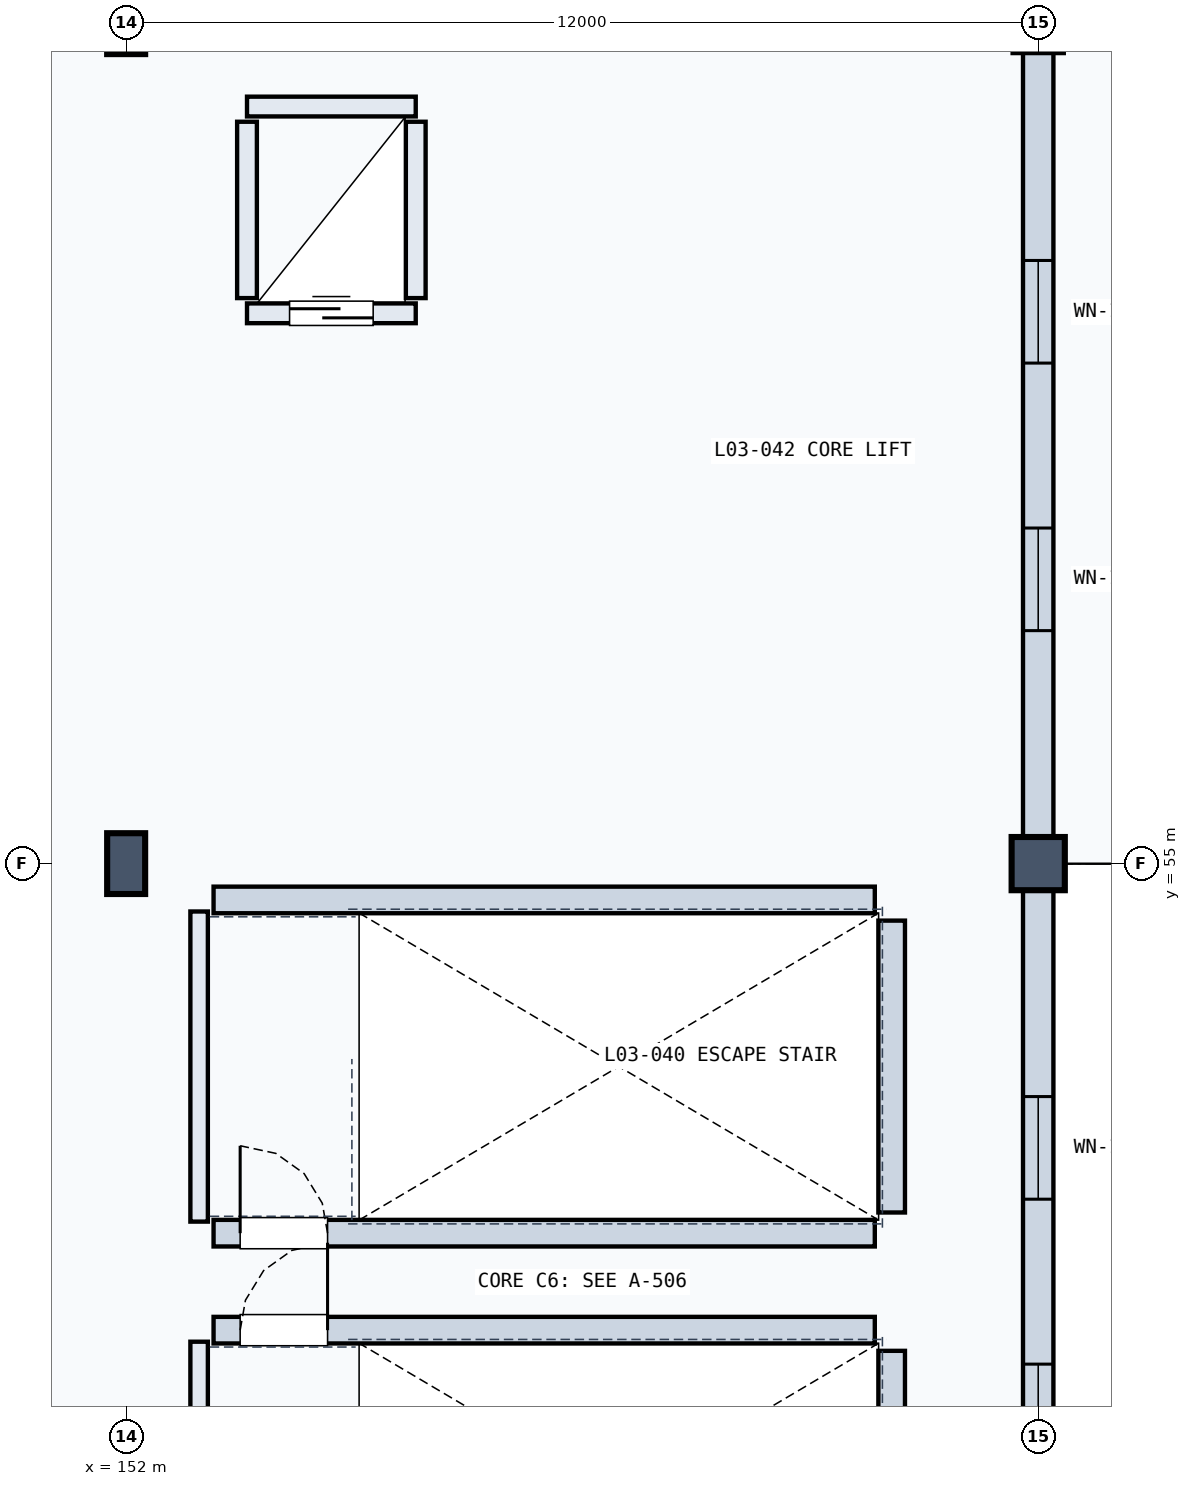
"""IFC4 building model, lengths in metres.
Left out: names, types, materials, properties, quantities, classifications, styles, units other than length and angle.
Written with IfcOpenShell. Run it as: python <this file> out.ifc"""

import sys

from ifc_helpers import new_model, si_unit, direction, frame, frame_2d, origin, origin_2d, place, context, subcontext, project, spatial, rectangle, extrude, element, fill, save


model = new_model("IFC4")
c1 = context("Model", 3, precision=1e-05, world=origin(), true_north=direction((0.0, 1.0)))
c2 = subcontext(c1, "Body", "Model", "MODEL_VIEW")
j1 = project(units=[si_unit("LENGTHUNIT", "METRE"), si_unit("PLANEANGLEUNIT", "RADIAN")], contexts=[c1])
p1 = place(None, origin())
s1 = spatial("IfcSite", under=j1, at=p1, CompositionType="ELEMENT")
p2 = place(p1, origin())
s2 = spatial("IfcBuilding", under=s1, at=p2, CompositionType="ELEMENT")
p3 = place(p2, frame((0.0, 0.0, 14.7)))
s3 = spatial("IfcBuildingStorey", under=s2, at=p3, CompositionType="ELEMENT", Elevation=14.7)
p4 = place(p3, frame((152.0, 55.0, 0.0), z_axis=(0.0, 0.0, 1.0), x_axis=(1.0, 0.0, 0.0)))
e1 = element("IfcColumn", 1, at=p4, inside=s3, PredefinedType="COLUMN", context=c2, shape_type="SweptSolid", body=[
    extrude(rectangle(XDim=0.5, YDim=0.8, at=origin_2d()), origin(), (0.0, 0.0, 1.0), 4.8),
])
p5 = place(p3, frame((152.0, 66.0, 0.0), z_axis=(0.0, 0.0, 1.0), x_axis=(1.0, 0.0, 0.0)))
e2 = element("IfcColumn", 2, at=p5, inside=s3, PredefinedType="COLUMN", context=c2, shape_type="SweptSolid", body=[
    extrude(rectangle(XDim=0.5, YDim=0.7, at=origin_2d()), origin(), (0.0, 0.0, 1.0), 4.8),
])
p6 = place(p3, frame((164.0, 55.0, 0.0), z_axis=(0.0, 0.0, 1.0), x_axis=(1.0, 0.0, 0.0)))
e3 = element("IfcColumn", 3, at=p6, inside=s3, PredefinedType="COLUMN", context=c2, shape_type="SweptSolid", body=[
    extrude(rectangle(XDim=0.7, YDim=0.7, at=origin_2d()), origin(), (0.0, 0.0, 1.0), 4.8),
])
p7 = place(p3, frame((164.0, 66.0, 0.0), z_axis=(0.0, 0.0, 1.0), x_axis=(1.0, 0.0, 0.0)))
e4 = element("IfcColumn", 4, at=p7, inside=s3, PredefinedType="COLUMN", context=c2, shape_type="SweptSolid", body=[
    extrude(rectangle(XDim=0.65, YDim=0.65, at=origin_2d()), origin(), (0.0, 0.0, 1.0), 4.8),
])
p8 = place(p3, frame((164.0, 44.22, 0.0), z_axis=(0.0, 0.0, 1.0), x_axis=(0.0, 1.0, 0.0)))
e5 = element("IfcWall", 5, at=p8, inside=s3, PredefinedType="SOLIDWALL", context=c2, shape_type="SweptSolid", body=[
    extrude(rectangle(XDim=10.56, YDim=0.4, at=frame_2d((5.28, 0.0))), origin(), (0.0, 0.0, 1.0), 3.89),
])
p9 = place(p8, frame((2.845, 0.0, 0.8)))
e6 = element("IfcOpeningElement", 6, at=p9, cuts=e5, PredefinedType="OPENING", context=c2, shape_type="SweptSolid", body=[
    extrude(rectangle(XDim=1.35, YDim=2.1, at=frame_2d((0.675, 1.05))), frame((0.0, 0.21, 0.0), z_axis=(0.0, -1.0, 0.0), x_axis=(1.0, 0.0, 0.0)), (0.0, 0.0, 1.0), 0.42),
])
p10 = place(p8, frame((6.365, 0.0, 0.8)))
e7 = element("IfcOpeningElement", 7, at=p10, cuts=e5, PredefinedType="OPENING", context=c2, shape_type="SweptSolid", body=[
    extrude(rectangle(XDim=1.35, YDim=2.1, at=frame_2d((0.675, 1.05))), frame((0.0, 0.21, 0.0), z_axis=(0.0, -1.0, 0.0), x_axis=(1.0, 0.0, 0.0)), (0.0, 0.0, 1.0), 0.42),
])
p11 = place(p3, frame((164.0, 55.22, 0.0), z_axis=(0.0, 0.0, 1.0), x_axis=(0.0, 1.0, 0.0)))
e8 = element("IfcWall", 8, at=p11, inside=s3, PredefinedType="SOLIDWALL", context=c2, shape_type="SweptSolid", body=[
    extrude(rectangle(XDim=10.56, YDim=0.4, at=frame_2d((5.28, 0.0))), origin(), (0.0, 0.0, 1.0), 4.465),
])
p12 = place(p11, frame((2.845, 0.0, 0.8)))
e9 = element("IfcOpeningElement", 9, at=p12, cuts=e8, PredefinedType="OPENING", context=c2, shape_type="SweptSolid", body=[
    extrude(rectangle(XDim=1.35, YDim=2.1, at=frame_2d((0.675, 1.05))), frame((0.0, 0.21, 0.0), z_axis=(0.0, -1.0, 0.0), x_axis=(1.0, 0.0, 0.0)), (0.0, 0.0, 1.0), 0.42),
])
p13 = place(p11, frame((6.365, 0.0, 0.8)))
e10 = element("IfcOpeningElement", 10, at=p13, cuts=e8, PredefinedType="OPENING", context=c2, shape_type="SweptSolid", body=[
    extrude(rectangle(XDim=1.35, YDim=2.1, at=frame_2d((0.675, 1.05))), frame((0.0, 0.21, 0.0), z_axis=(0.0, -1.0, 0.0), x_axis=(1.0, 0.0, 0.0)), (0.0, 0.0, 1.0), 0.42),
])
p14 = place(p3, frame((152.96, 44.63, 0.0), z_axis=(0.0, 0.0, 1.0), x_axis=(0.0, 1.0, 0.0)))
e11 = element("IfcWall", 11, at=p14, inside=s3, PredefinedType="SOLIDWALL", context=c2, shape_type="SweptSolid", body=[
    extrude(rectangle(XDim=4.08, YDim=0.23, at=frame_2d((2.04, 0.0))), origin(), (0.0, 0.0, 1.0), 4.46),
])
p15 = place(p3, frame((162.072, 44.05, 0.0), z_axis=(0.0, 0.0, 1.0), x_axis=(0.0, 1.0, 0.0)))
e12 = element("IfcWall", 12, at=p15, inside=s3, PredefinedType="SOLIDWALL", context=c2, shape_type="SweptSolid", body=[
    extrude(rectangle(XDim=4.54, YDim=0.35, at=frame_2d((2.27, 0.0))), origin(), (0.0, 0.0, 1.0), 4.46),
])
p16 = place(p3, frame((153.15, 48.862, 0.0), z_axis=(0.0, 0.0, 1.0), x_axis=(1.0, 0.0, 0.0)))
e13 = element("IfcWall", 13, at=p16, inside=s3, PredefinedType="SOLIDWALL", context=c2, shape_type="SweptSolid", body=[
    extrude(rectangle(XDim=8.7, YDim=0.35, at=frame_2d((4.35, 0.0))), origin(), (0.0, 0.0, 1.0), 4.46),
])
p17 = place(p16, frame((0.35, 0.0, 0.0)))
e14 = element("IfcOpeningElement", 14, at=p17, cuts=e13, PredefinedType="OPENING", context=c2, shape_type="SweptSolid", body=[
    extrude(rectangle(XDim=1.15, YDim=2.2, at=frame_2d((0.575, 1.1))), frame((0.0, 0.185, 0.0), z_axis=(0.0, -1.0, 0.0), x_axis=(1.0, 0.0, 0.0)), (0.0, 0.0, 1.0), 0.37),
])
p18 = place(p3, frame((152.96, 50.29, 0.0), z_axis=(0.0, 0.0, 1.0), x_axis=(0.0, 1.0, 0.0)))
e15 = element("IfcWall", 15, at=p18, inside=s3, PredefinedType="SOLIDWALL", context=c2, shape_type="SweptSolid", body=[
    extrude(rectangle(XDim=4.08, YDim=0.23, at=frame_2d((2.04, 0.0))), origin(), (0.0, 0.0, 1.0), 4.46),
])
p19 = place(p3, frame((162.072, 50.41, 0.0), z_axis=(0.0, 0.0, 1.0), x_axis=(0.0, 1.0, 0.0)))
e16 = element("IfcWall", 16, at=p19, inside=s3, PredefinedType="SOLIDWALL", context=c2, shape_type="SweptSolid", body=[
    extrude(rectangle(XDim=3.84, YDim=0.35, at=frame_2d((1.92, 0.0))), origin(), (0.0, 0.0, 1.0), 4.46),
])
p20 = place(p3, frame((153.15, 50.138, 0.0), z_axis=(0.0, 0.0, 1.0), x_axis=(1.0, 0.0, 0.0)))
e17 = element("IfcWall", 17, at=p20, inside=s3, PredefinedType="SOLIDWALL", context=c2, shape_type="SweptSolid", body=[
    extrude(rectangle(XDim=8.7, YDim=0.35, at=frame_2d((4.35, 0.0))), origin(), (0.0, 0.0, 1.0), 4.46),
])
p21 = place(p20, frame((0.35, 0.0, 0.0)))
e18 = element("IfcOpeningElement", 18, at=p21, cuts=e17, PredefinedType="OPENING", context=c2, shape_type="SweptSolid", body=[
    extrude(rectangle(XDim=1.15, YDim=2.2, at=frame_2d((0.575, 1.1))), frame((0.0, 0.185, 0.0), z_axis=(0.0, -1.0, 0.0), x_axis=(1.0, 0.0, 0.0)), (0.0, 0.0, 1.0), 0.37),
])
p22 = place(p3, frame((153.15, 54.522, 0.0), z_axis=(0.0, 0.0, 1.0), x_axis=(1.0, 0.0, 0.0)))
e19 = element("IfcWall", 19, at=p22, inside=s3, PredefinedType="SOLIDWALL", context=c2, shape_type="SweptSolid", body=[
    extrude(rectangle(XDim=8.7, YDim=0.35, at=frame_2d((4.35, 0.0))), origin(), (0.0, 0.0, 1.0), 4.46),
])
p23 = place(p3, frame((153.59, 62.24, 0.0), z_axis=(0.0, 0.0, 1.0), x_axis=(1.0, 0.0, 0.0)))
e20 = element("IfcWall", 20, at=p23, inside=s3, PredefinedType="SOLIDWALL", context=c2, shape_type="SweptSolid", body=[
    extrude(rectangle(XDim=2.22, YDim=0.26, at=frame_2d((1.11, 0.0))), origin(), (0.0, 0.0, 1.0), 4.46),
])
p24 = place(p23, frame((0.56, 0.0, 0.0)))
e21 = element("IfcOpeningElement", 21, at=p24, cuts=e20, PredefinedType="OPENING", context=c2, shape_type="SweptSolid", body=[
    extrude(rectangle(XDim=1.1, YDim=2.15, at=frame_2d((0.55, 1.075))), frame((0.0, 0.14, 0.0), z_axis=(0.0, -1.0, 0.0), x_axis=(1.0, 0.0, 0.0)), (0.0, 0.0, 1.0), 0.28),
])
p25 = place(p3, frame((153.59, 64.96, 0.0), z_axis=(0.0, 0.0, 1.0), x_axis=(1.0, 0.0, 0.0)))
e22 = element("IfcWall", 22, at=p25, inside=s3, PredefinedType="SOLIDWALL", context=c2, shape_type="SweptSolid", body=[
    extrude(rectangle(XDim=2.22, YDim=0.26, at=frame_2d((1.11, 0.0))), origin(), (0.0, 0.0, 1.0), 4.46),
])
for number, where, z_axis, x_axis in (
    (23, (153.59, 62.44, 0.0), (0.0, 0.0, 1.0), (0.0, 1.0, 0.0)),
    (24, (155.81, 62.44, 0.0), (0.0, 0.0, 1.0), (0.0, 1.0, 0.0)),
):
    element("IfcWall", number, at=place(p3, frame(where, z_axis=z_axis, x_axis=x_axis)), inside=s3, PredefinedType="SOLIDWALL", context=c2, shape_type="SweptSolid", body=[
        extrude(rectangle(XDim=2.32, YDim=0.26, at=frame_2d((1.16, 0.0))), origin(), (0.0, 0.0, 1.0), 4.46),
    ])
p26 = place(p9, origin())
e25 = element("IfcWindow", 25, at=p26, inside=s3, PartitioningType="SINGLE_PANEL", PredefinedType="WINDOW", context=c2, shape_type="SweptSolid", body=[
    extrude(rectangle(XDim=1.35, YDim=2.1, at=frame_2d((0.675, 1.05))), frame((0.0, 0.03, 0.0), z_axis=(0.0, -1.0, 0.0), x_axis=(1.0, 0.0, 0.0)), (0.0, 0.0, 1.0), 0.06),
])
fill(e6, e25)
p27 = place(p10, origin())
e26 = element("IfcWindow", 26, at=p27, inside=s3, PartitioningType="SINGLE_PANEL", PredefinedType="WINDOW", context=c2, shape_type="SweptSolid", body=[
    extrude(rectangle(XDim=1.35, YDim=2.1, at=frame_2d((0.675, 1.05))), frame((0.0, 0.03, 0.0), z_axis=(0.0, -1.0, 0.0), x_axis=(1.0, 0.0, 0.0)), (0.0, 0.0, 1.0), 0.06),
])
fill(e7, e26)
p28 = place(p12, origin())
e27 = element("IfcWindow", 27, at=p28, inside=s3, PartitioningType="SINGLE_PANEL", PredefinedType="WINDOW", context=c2, shape_type="SweptSolid", body=[
    extrude(rectangle(XDim=1.35, YDim=2.1, at=frame_2d((0.675, 1.05))), frame((0.0, 0.03, 0.0), z_axis=(0.0, -1.0, 0.0), x_axis=(1.0, 0.0, 0.0)), (0.0, 0.0, 1.0), 0.06),
])
fill(e9, e27)
p29 = place(p13, origin())
e28 = element("IfcWindow", 28, at=p29, inside=s3, PartitioningType="SINGLE_PANEL", PredefinedType="WINDOW", context=c2, shape_type="SweptSolid", body=[
    extrude(rectangle(XDim=1.35, YDim=2.1, at=frame_2d((0.675, 1.05))), frame((0.0, 0.03, 0.0), z_axis=(0.0, -1.0, 0.0), x_axis=(1.0, 0.0, 0.0)), (0.0, 0.0, 1.0), 0.06),
])
fill(e10, e28)
p30 = place(p17, origin())
e29 = element("IfcDoor", 29, at=p30, inside=s3, OperationType="SINGLE_SWING_RIGHT", PredefinedType="DOOR", context=c2, shape_type="SweptSolid", body=[
    extrude(rectangle(XDim=1.15, YDim=2.2, at=frame_2d((0.575, 1.1))), frame((0.0, 0.025, 0.0), z_axis=(0.0, -1.0, 0.0), x_axis=(1.0, 0.0, 0.0)), (0.0, 0.0, 1.0), 0.05),
])
fill(e14, e29)
p31 = place(p21, origin())
e30 = element("IfcDoor", 30, at=p31, inside=s3, OperationType="SINGLE_SWING_LEFT", PredefinedType="DOOR", context=c2, shape_type="SweptSolid", body=[
    extrude(rectangle(XDim=1.15, YDim=2.2, at=frame_2d((0.575, 1.1))), frame((0.0, 0.025, 0.0), z_axis=(0.0, -1.0, 0.0), x_axis=(1.0, 0.0, 0.0)), (0.0, 0.0, 1.0), 0.05),
])
fill(e18, e30)
p32 = place(p24, origin())
e31 = element("IfcDoor", 31, at=p32, inside=s3, OperationType="SLIDING_TO_LEFT", PredefinedType="DOOR", context=c2, shape_type="SweptSolid", body=[
    extrude(rectangle(XDim=1.1, YDim=2.15, at=frame_2d((0.55, 1.075))), frame((0.0, 0.025, 0.0), z_axis=(0.0, -1.0, 0.0), x_axis=(1.0, 0.0, 0.0)), (0.0, 0.0, 1.0), 0.05),
])
fill(e21, e31)
save(model, sys.argv[1])
